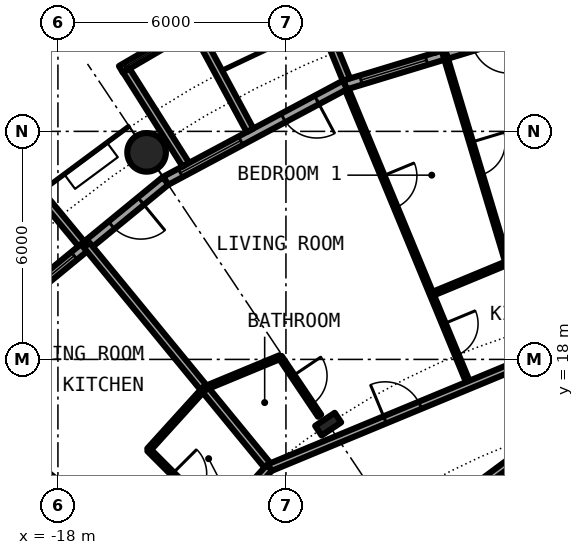
"""IFC4 building model, lengths in metres.
Left out: names, types, materials, properties, quantities, classifications, styles, units other than length and angle.
Written with IfcOpenShell. Run it as: python <this file> out.ifc"""

import sys

from ifc_helpers import new_model, si_unit, direction, frame, frame_2d, origin, origin_2d, place, context, subcontext, project, spatial, rectangle, circle, hollow_circle, i_section, extrude, element, fill, save


model = new_model("IFC4")
c1 = context("Model", 3, precision=1e-05, world=origin(), true_north=direction((0.0, 1.0)))
c2 = subcontext(c1, "Body", "Model", "MODEL_VIEW")
j1 = project(units=[si_unit("LENGTHUNIT", "METRE"), si_unit("PLANEANGLEUNIT", "RADIAN")], contexts=[c1])
p1 = place(None, origin())
s1 = spatial("IfcSite", under=j1, at=p1, CompositionType="ELEMENT")
p2 = place(p1, origin())
s2 = spatial("IfcBuilding", under=s1, at=p2, CompositionType="ELEMENT")
p3 = place(p2, frame((0.0, 0.0, 50.25)))
s3 = spatial("IfcBuildingStorey", under=s2, at=p3, CompositionType="ELEMENT", Elevation=50.25)
p4 = place(p3, frame((-15.667, 23.448, 0.0), z_axis=(0.0, 0.0, 1.0), x_axis=(1.0, 0.0, 0.0)))
e1 = element("IfcColumn", 1, at=p4, inside=s3, PredefinedType="COLUMN", context=c2, shape_type="SweptSolid", body=[
    extrude(hollow_circle(Radius=0.508, WallThickness=0.05, at=origin_2d()), origin(), (0.0, 0.0, 1.0), 3.05),
])
p5 = place(p3, frame((-10.889, 16.297, 0.0), z_axis=(0.0, 0.0, 1.0), x_axis=(-0.55557023302, 0.831469612303, 0.0)))
e2 = element("IfcColumn", 2, at=p5, inside=s3, PredefinedType="COLUMN", context=c2, shape_type="SweptSolid", body=[
    extrude(i_section(OverallWidth=0.305, OverallDepth=0.62, WebThickness=0.021, FlangeThickness=0.04, FilletRadius=0.027, at=origin_2d()), origin(), (0.0, 0.0, 1.0), 3.05),
])
p6 = place(p3, frame((-5.326, 26.775, 0.0), z_axis=(0.0, 0.0, 1.0), x_axis=(-0.956965678721, -0.290201119486, 0.0)))
e3 = element("IfcWall", 3, at=p6, inside=s3, PredefinedType="SOLIDWALL", context=c2, shape_type="SweptSolid", body=[
    extrude(rectangle(XDim=5.351, YDim=0.25, at=frame_2d((2.676, 0.0))), origin(), (0.0, 0.0, 1.0), 2.7),
])
p7 = place(p6, frame((0.841, 0.0, 0.0)))
e4 = element("IfcOpeningElement", 4, at=p7, cuts=e3, PredefinedType="OPENING", context=c2, shape_type="SweptSolid", body=[
    extrude(rectangle(XDim=1.0, YDim=2.2, at=frame_2d((0.5, 1.1))), frame((0.0, 0.135, 0.0), z_axis=(0.0, -1.0, 0.0), x_axis=(1.0, 0.0, 0.0)), (0.0, 0.0, 1.0), 0.27),
])
p8 = place(p6, frame((3.111, 0.0, 0.3)))
e5 = element("IfcOpeningElement", 5, at=p8, cuts=e3, PredefinedType="OPENING", context=c2, shape_type="SweptSolid", body=[
    extrude(rectangle(XDim=1.8, YDim=2.1, at=frame_2d((0.9, 1.05))), frame((0.0, 0.135, 0.0), z_axis=(0.0, -1.0, 0.0), x_axis=(1.0, 0.0, 0.0)), (0.0, 0.0, 1.0), 0.27),
])
p9 = place(p3, frame((-8.009, 26.092, -0.03), z_axis=(0.0, 0.0, 1.0), x_axis=(-0.293406695073, 0.955987715029, 0.0)))
e6 = element("IfcWall", 6, at=p9, inside=s3, PredefinedType="SOLIDWALL", context=c2, shape_type="SweptSolid", body=[
    extrude(rectangle(XDim=3.006, YDim=0.2, at=frame_2d((1.503, 0.0))), origin(), (0.0, 0.0, 1.0), 2.73),
])
p10 = place(p3, frame((-10.409, 25.364, -0.03), z_axis=(0.0, 0.0, 1.0), x_axis=(-0.379509886562, 0.925187681501, 0.0)))
e7 = element("IfcWall", 7, at=p10, inside=s3, PredefinedType="SOLIDWALL", context=c2, shape_type="SweptSolid", body=[
    extrude(rectangle(XDim=2.883, YDim=0.2, at=frame_2d((1.441, 0.0))), origin(), (0.0, 0.0, 1.0), 2.73),
])
p11 = place(p3, frame((-10.447, 25.222, 0.0), z_axis=(0.0, 0.0, 1.0), x_axis=(-0.881915646801, -0.471407246368, 0.0)))
e8 = element("IfcWall", 8, at=p11, inside=s3, PredefinedType="SOLIDWALL", context=c2, shape_type="SweptSolid", body=[
    extrude(rectangle(XDim=5.352, YDim=0.25, at=frame_2d((2.676, 0.0))), origin(), (0.0, 0.0, 1.0), 2.7),
])
p12 = place(p11, frame((0.841, 0.0, 0.0)))
e9 = element("IfcOpeningElement", 9, at=p12, cuts=e8, PredefinedType="OPENING", context=c2, shape_type="SweptSolid", body=[
    extrude(rectangle(XDim=1.0, YDim=2.2, at=frame_2d((0.5, 1.1))), frame((0.0, 0.135, 0.0), z_axis=(0.0, -1.0, 0.0), x_axis=(1.0, 0.0, 0.0)), (0.0, 0.0, 1.0), 0.27),
])
p13 = place(p11, frame((3.111, 0.0, 0.3)))
e10 = element("IfcOpeningElement", 10, at=p13, cuts=e8, PredefinedType="OPENING", context=c2, shape_type="SweptSolid", body=[
    extrude(rectangle(XDim=1.8, YDim=2.1, at=frame_2d((0.9, 1.05))), frame((0.0, 0.135, 0.0), z_axis=(0.0, -1.0, 0.0), x_axis=(1.0, 0.0, 0.0)), (0.0, 0.0, 1.0), 0.27),
])
p14 = place(p3, frame((-14.327, 26.812, -0.03), z_axis=(0.0, 0.0, 1.0), x_axis=(-0.863346521872, -0.504611517081, 0.0)))
e11 = element("IfcWall", 11, at=p14, inside=s3, PredefinedType="SOLIDWALL", context=c2, shape_type="SweptSolid", body=[
    extrude(rectangle(XDim=2.336, YDim=0.2, at=frame_2d((1.168, 0.0))), origin(), (0.0, 0.0, 1.0), 2.73),
])
p15 = place(p14, frame((0.128, 0.0, 0.33)))
e12 = element("IfcOpeningElement", 12, at=p15, cuts=e11, PredefinedType="OPENING", context=c2, shape_type="SweptSolid", body=[
    extrude(circle(Radius=1.04, at=frame_2d((1.04, 1.04))), frame((0.0, 0.11, 0.0), z_axis=(0.0, -1.0, 0.0), x_axis=(1.0, 0.0, 0.0)), (0.0, 0.0, 1.0), 0.22),
])
p16 = place(p3, frame((-12.945, 24.029, -0.03), z_axis=(0.0, 0.0, 1.0), x_axis=(-0.474424310775, 0.88029629861, 0.0)))
e13 = element("IfcWall", 13, at=p16, inside=s3, PredefinedType="SOLIDWALL", context=c2, shape_type="SweptSolid", body=[
    extrude(rectangle(XDim=3.006, YDim=0.2, at=frame_2d((1.503, 0.0))), origin(), (0.0, 0.0, 1.0), 2.73),
])
p17 = place(p3, frame((-14.635, 23.126, -0.03), z_axis=(0.0, 0.0, 1.0), x_axis=(-0.534437802731, 0.845207805816, 0.0)))
e14 = element("IfcWall", 14, at=p17, inside=s3, PredefinedType="SOLIDWALL", context=c2, shape_type="SweptSolid", body=[
    extrude(rectangle(XDim=2.932, YDim=0.2, at=frame_2d((1.466, 0.0))), origin(), (0.0, 0.0, 1.0), 2.73),
])
p18 = place(p3, frame((-15.167, 22.699, 0.0), z_axis=(0.0, 0.0, 1.0), x_axis=(-0.773019449054, -0.634382322723, 0.0)))
e15 = element("IfcWall", 15, at=p18, inside=s3, PredefinedType="SOLIDWALL", context=c2, shape_type="SweptSolid", body=[
    extrude(rectangle(XDim=5.352, YDim=0.25, at=frame_2d((2.676, 0.0))), origin(), (0.0, 0.0, 1.0), 2.7),
])
p19 = place(p18, frame((0.841, 0.0, 0.0)))
e16 = element("IfcOpeningElement", 16, at=p19, cuts=e15, PredefinedType="OPENING", context=c2, shape_type="SweptSolid", body=[
    extrude(rectangle(XDim=1.0, YDim=2.2, at=frame_2d((0.5, 1.1))), frame((0.0, 0.135, 0.0), z_axis=(0.0, -1.0, 0.0), x_axis=(1.0, 0.0, 0.0)), (0.0, 0.0, 1.0), 0.27),
])
p20 = place(p18, frame((3.111, 0.0, 0.3)))
e17 = element("IfcOpeningElement", 17, at=p20, cuts=e15, PredefinedType="OPENING", context=c2, shape_type="SweptSolid", body=[
    extrude(rectangle(XDim=1.8, YDim=2.1, at=frame_2d((0.9, 1.05))), frame((0.0, 0.135, 0.0), z_axis=(0.0, -1.0, 0.0), x_axis=(1.0, 0.0, 0.0)), (0.0, 0.0, 1.0), 0.27),
])
p21 = place(p3, frame((-17.384, 21.041, -0.03), z_axis=(0.0, 0.0, 1.0), x_axis=(-0.63709551667, 0.770784861449, 0.0)))
e18 = element("IfcWall", 18, at=p21, inside=s3, PredefinedType="SOLIDWALL", context=c2, shape_type="SweptSolid", body=[
    extrude(rectangle(XDim=3.006, YDim=0.2, at=frame_2d((1.503, 0.0))), origin(), (0.0, 0.0, 1.0), 2.73),
])
p22 = place(p3, frame((-10.398, 25.107, 0.0), z_axis=(0.0, 0.0, 1.0), x_axis=(0.382458509789, -0.923972666419, 0.0)))
e19 = element("IfcWall", 19, at=p22, inside=s3, PredefinedType="PARTITIONING", context=c2, shape_type="SweptSolid", body=[
    extrude(rectangle(XDim=8.419, YDim=0.1, at=frame_2d((4.209, 0.0))), origin(), (0.0, 0.0, 1.0), 2.7),
])
p23 = place(p22, frame((6.677, 0.0, 0.0)))
e20 = element("IfcOpeningElement", 20, at=p23, cuts=e19, PredefinedType="OPENING", context=c2, shape_type="SweptSolid", body=[
    extrude(rectangle(XDim=0.9, YDim=2.3, at=frame_2d((0.45, 1.15))), frame((0.0, 0.06, 0.0), z_axis=(0.0, -1.0, 0.0), x_axis=(1.0, 0.0, 0.0)), (0.0, 0.0, 1.0), 0.12),
])
p24 = place(p22, frame((2.468, 0.0, 0.0)))
e21 = element("IfcOpeningElement", 21, at=p24, cuts=e19, PredefinedType="OPENING", context=c2, shape_type="SweptSolid", body=[
    extrude(rectangle(XDim=0.9, YDim=2.3, at=frame_2d((0.45, 1.15))), frame((0.0, 0.06, 0.0), z_axis=(0.0, -1.0, 0.0), x_axis=(1.0, 0.0, 0.0)), (0.0, 0.0, 1.0), 0.12),
])
p25 = place(p3, frame((-22.596, 15.097, 0.0), z_axis=(0.0, 0.0, 1.0), x_axis=(0.831507055747, -0.555514190857, 0.0)))
e22 = element("IfcWall", 22, at=p25, inside=s3, PredefinedType="PARTITIONING", context=c2, shape_type="SweptSolid", body=[
    extrude(rectangle(XDim=7.265, YDim=0.2, at=frame_2d((3.633, 0.0))), origin(), (0.0, 0.0, 1.0), 2.7),
])
p26 = place(p3, frame((-21.014, 17.231, 0.0), z_axis=(0.0, 0.0, 1.0), x_axis=(0.773219330916, -0.634138680651, 0.0)))
e23 = element("IfcWall", 23, at=p26, inside=s3, PredefinedType="PARTITIONING", context=c2, shape_type="SweptSolid", body=[
    extrude(rectangle(XDim=5.089, YDim=0.1, at=frame_2d((2.544, 0.0))), origin(), (0.0, 0.0, 1.0), 2.7),
])
p27 = place(p26, frame((2.095, 0.0, 0.0)))
e24 = element("IfcOpeningElement", 24, at=p27, cuts=e23, PredefinedType="OPENING", context=c2, shape_type="SweptSolid", body=[
    extrude(rectangle(XDim=0.9, YDim=2.3, at=frame_2d((0.45, 1.15))), frame((0.0, 0.06, 0.0), z_axis=(0.0, -1.0, 0.0), x_axis=(1.0, 0.0, 0.0)), (0.0, 0.0, 1.0), 0.12),
])
p28 = place(p3, frame((-17.243, 21.005, 0.0), z_axis=(0.0, 0.0, 1.0), x_axis=(0.63447412651, -0.772944100689, 0.0)))
e25 = element("IfcWall", 25, at=p28, inside=s3, PredefinedType="PARTITIONING", context=c2, shape_type="SweptSolid", body=[
    extrude(rectangle(XDim=7.576, YDim=0.2, at=frame_2d((3.788, 0.0))), origin(), (0.0, 0.0, 1.0), 2.7),
])
p29 = place(p3, frame((-15.612, 15.622, 0.0), z_axis=(0.0, 0.0, 1.0), x_axis=(0.706741540154, -0.707471833659, 0.0)))
e26 = element("IfcWall", 26, at=p29, inside=s3, PredefinedType="PARTITIONING", context=c2, shape_type="SweptSolid", body=[
    extrude(rectangle(XDim=2.674, YDim=0.1, at=frame_2d((1.337, 0.0))), origin(), (0.0, 0.0, 1.0), 2.7),
])
p30 = place(p29, frame((0.887, 0.0, 0.0)))
e27 = element("IfcOpeningElement", 27, at=p30, cuts=e26, PredefinedType="OPENING", context=c2, shape_type="SweptSolid", body=[
    extrude(rectangle(XDim=0.9, YDim=2.3, at=frame_2d((0.45, 1.15))), frame((0.0, 0.06, 0.0), z_axis=(0.0, -1.0, 0.0), x_axis=(1.0, 0.0, 0.0)), (0.0, 0.0, 1.0), 0.12),
])
p31 = place(p3, frame((-12.153, 18.064, 0.0), z_axis=(0.0, 0.0, 1.0), x_axis=(0.558084773293, -0.829783939239, 0.0)))
e28 = element("IfcWall", 28, at=p31, inside=s3, PredefinedType="PARTITIONING", context=c2, shape_type="SweptSolid", body=[
    extrude(rectangle(XDim=1.862, YDim=0.1, at=frame_2d((0.931, 0.0))), origin(), (0.0, 0.0, 1.0), 2.7),
])
p32 = place(p31, frame((0.6, 0.0, 0.0)))
e29 = element("IfcOpeningElement", 29, at=p32, cuts=e28, PredefinedType="OPENING", context=c2, shape_type="SweptSolid", body=[
    extrude(rectangle(XDim=0.9, YDim=2.3, at=frame_2d((0.45, 1.15))), frame((0.0, 0.06, 0.0), z_axis=(0.0, -1.0, 0.0), x_axis=(1.0, 0.0, 0.0)), (0.0, 0.0, 1.0), 0.12),
])
p33 = place(p3, frame((-7.821, 26.025, 0.0), z_axis=(0.0, 0.0, 1.0), x_axis=(0.287793773423, -0.957692405723, 0.0)))
e30 = element("IfcWall", 30, at=p33, inside=s3, PredefinedType="PARTITIONING", context=c2, shape_type="SweptSolid", body=[
    extrude(rectangle(XDim=5.726, YDim=0.1, at=frame_2d((2.863, 0.0))), origin(), (0.0, 0.0, 1.0), 2.7),
])
p34 = place(p33, frame((2.413, 0.0, 0.0)))
e31 = element("IfcOpeningElement", 31, at=p34, cuts=e30, PredefinedType="OPENING", context=c2, shape_type="SweptSolid", body=[
    extrude(rectangle(XDim=0.9, YDim=2.3, at=frame_2d((0.45, 1.15))), frame((0.0, 0.06, 0.0), z_axis=(0.0, -1.0, 0.0), x_axis=(1.0, 0.0, 0.0)), (0.0, 0.0, 1.0), 0.12),
])
p35 = place(p3, frame((-14.037, 9.4, 0.0), z_axis=(0.0, 0.0, 1.0), x_axis=(0.803202106898, 0.595706618626, 0.0)))
e32 = element("IfcWall", 32, at=p35, inside=s3, PredefinedType="PARTITIONING", context=c2, shape_type="SweptSolid", body=[
    extrude(rectangle(XDim=11.368, YDim=0.2, at=frame_2d((5.684, 0.0))), origin(), (0.0, 0.0, 1.0), 2.7),
])
p36 = place(p35, frame((5.988, 0.0, 0.0)))
e33 = element("IfcOpeningElement", 33, at=p36, cuts=e32, PredefinedType="OPENING", context=c2, shape_type="SweptSolid", body=[
    extrude(rectangle(XDim=1.0, YDim=2.3, at=frame_2d((0.5, 1.15))), frame((0.0, 0.11, 0.0), z_axis=(0.0, -1.0, 0.0), x_axis=(1.0, 0.0, 0.0)), (0.0, 0.0, 1.0), 0.22),
])
p37 = place(p3, frame((-12.435, 15.15, 0.0), z_axis=(0.0, 0.0, 1.0), x_axis=(0.923845560554, 0.38276543763, 0.0)))
e34 = element("IfcWall", 34, at=p37, inside=s3, PredefinedType="PARTITIONING", context=c2, shape_type="SweptSolid", body=[
    extrude(rectangle(XDim=11.381, YDim=0.2, at=frame_2d((5.69, 0.0))), origin(), (0.0, 0.0, 1.0), 2.7),
])
p38 = place(p37, frame((3.293, 0.0, 0.0)))
e35 = element("IfcOpeningElement", 35, at=p38, cuts=e34, PredefinedType="OPENING", context=c2, shape_type="SweptSolid", body=[
    extrude(rectangle(XDim=1.0, YDim=2.3, at=frame_2d((0.5, 1.15))), frame((0.0, 0.11, 0.0), z_axis=(0.0, -1.0, 0.0), x_axis=(1.0, 0.0, 0.0)), (0.0, 0.0, 1.0), 0.22),
])
p39 = place(p3, frame((-16.193, 11.003, 0.0), z_axis=(0.0, 0.0, 1.0), x_axis=(0.671514934772, 0.740991020444, 0.0)))
e36 = element("IfcWall", 36, at=p39, inside=s3, PredefinedType="PARTITIONING", context=c2, shape_type="SweptSolid", body=[
    extrude(rectangle(XDim=5.598, YDim=0.2, at=frame_2d((2.799, 0.0))), origin(), (0.0, 0.0, 1.0), 2.38),
])
p40 = place(p39, frame((1.293, 0.0, 0.0)))
e37 = element("IfcOpeningElement", 37, at=p40, cuts=e36, PredefinedType="OPENING", context=c2, shape_type="SweptSolid", body=[
    extrude(rectangle(XDim=1.0, YDim=2.3, at=frame_2d((0.5, 1.15))), frame((0.0, 0.11, 0.0), z_axis=(0.0, -1.0, 0.0), x_axis=(1.0, 0.0, 0.0)), (0.0, 0.0, 1.0), 0.22),
])
p41 = place(p3, frame((-14.149, 17.236, 0.0), z_axis=(0.0, 0.0, 1.0), x_axis=(0.923874819588, 0.382694810171, 0.0)))
e38 = element("IfcWall", 38, at=p41, inside=s3, PredefinedType="PARTITIONING", context=c2, shape_type="SweptSolid", body=[
    extrude(rectangle(XDim=2.158, YDim=0.1, at=frame_2d((1.079, 0.0))), origin(), (0.0, 0.0, 1.0), 2.7),
])
p42 = place(p3, frame((-8.166, 19.715, 0.0), z_axis=(0.0, 0.0, 1.0), x_axis=(0.923844914631, 0.382766996632, 0.0)))
e39 = element("IfcWall", 39, at=p42, inside=s3, PredefinedType="PARTITIONING", context=c2, shape_type="SweptSolid", body=[
    extrude(rectangle(XDim=6.474, YDim=0.1, at=frame_2d((3.237, 0.0))), origin(), (0.0, 0.0, 1.0), 2.7),
])
p43 = place(p3, frame((-15.613, 15.621, 0.0), z_axis=(0.0, 0.0, 1.0), x_axis=(0.67169789574, 0.740825172937, 0.0)))
e40 = element("IfcWall", 40, at=p43, inside=s3, PredefinedType="PARTITIONING", context=c2, shape_type="SweptSolid", body=[
    extrude(rectangle(XDim=2.183, YDim=0.1, at=frame_2d((1.091, 0.0))), origin(), (0.0, 0.0, 1.0), 2.7),
])
p44 = place(p8, origin())
e41 = element("IfcWindow", 41, at=p44, inside=s3, PartitioningType="SINGLE_PANEL", PredefinedType="WINDOW", context=c2, shape_type="SweptSolid", body=[
    extrude(rectangle(XDim=1.8, YDim=2.1, at=frame_2d((0.9, 1.05))), frame((0.0, 0.03, 0.0), z_axis=(0.0, -1.0, 0.0), x_axis=(1.0, 0.0, 0.0)), (0.0, 0.0, 1.0), 0.06),
])
fill(e5, e41)
p45 = place(p12, origin())
e42 = element("IfcDoor", 42, at=p45, inside=s3, OperationType="SINGLE_SWING_LEFT", PredefinedType="DOOR", context=c2, shape_type="SweptSolid", body=[
    extrude(rectangle(XDim=1.0, YDim=2.2, at=frame_2d((0.5, 1.1))), frame((0.0, 0.025, 0.0), z_axis=(0.0, -1.0, 0.0), x_axis=(1.0, 0.0, 0.0)), (0.0, 0.0, 1.0), 0.05),
])
fill(e9, e42)
p46 = place(p13, origin())
e43 = element("IfcWindow", 43, at=p46, inside=s3, PartitioningType="SINGLE_PANEL", PredefinedType="WINDOW", context=c2, shape_type="SweptSolid", body=[
    extrude(rectangle(XDim=1.8, YDim=2.1, at=frame_2d((0.9, 1.05))), frame((0.0, 0.03, 0.0), z_axis=(0.0, -1.0, 0.0), x_axis=(1.0, 0.0, 0.0)), (0.0, 0.0, 1.0), 0.06),
])
fill(e10, e43)
p47 = place(p15, origin())
e44 = element("IfcWindow", 44, at=p47, inside=s3, PartitioningType="SINGLE_PANEL", PredefinedType="WINDOW", context=c2, shape_type="SweptSolid", body=[
    extrude(circle(Radius=1.04, at=frame_2d((1.04, 1.04))), frame((0.0, 0.03, 0.0), z_axis=(0.0, -1.0, 0.0), x_axis=(1.0, 0.0, 0.0)), (0.0, 0.0, 1.0), 0.06),
])
fill(e12, e44)
p48 = place(p19, origin())
e45 = element("IfcDoor", 45, at=p48, inside=s3, OperationType="SINGLE_SWING_LEFT", PredefinedType="DOOR", context=c2, shape_type="SweptSolid", body=[
    extrude(rectangle(XDim=1.0, YDim=2.2, at=frame_2d((0.5, 1.1))), frame((0.0, 0.025, 0.0), z_axis=(0.0, -1.0, 0.0), x_axis=(1.0, 0.0, 0.0)), (0.0, 0.0, 1.0), 0.05),
])
fill(e16, e45)
p49 = place(p20, origin())
e46 = element("IfcWindow", 46, at=p49, inside=s3, PartitioningType="SINGLE_PANEL", PredefinedType="WINDOW", context=c2, shape_type="SweptSolid", body=[
    extrude(rectangle(XDim=1.8, YDim=2.1, at=frame_2d((0.9, 1.05))), frame((0.0, 0.03, 0.0), z_axis=(0.0, -1.0, 0.0), x_axis=(1.0, 0.0, 0.0)), (0.0, 0.0, 1.0), 0.06),
])
fill(e17, e46)
p50 = place(p38, origin())
e47 = element("IfcDoor", 47, at=p50, inside=s3, OperationType="SINGLE_SWING_LEFT", PredefinedType="DOOR", context=c2, shape_type="SweptSolid", body=[
    extrude(rectangle(XDim=1.0, YDim=2.3, at=frame_2d((0.5, 1.15))), frame((0.0, 0.025, 0.0), z_axis=(0.0, -1.0, 0.0), x_axis=(1.0, 0.0, 0.0)), (0.0, 0.0, 1.0), 0.05),
])
fill(e35, e47)
p51 = place(p32, origin())
e48 = element("IfcDoor", 48, at=p51, inside=s3, OperationType="SINGLE_SWING_RIGHT", PredefinedType="DOOR", context=c2, shape_type="SweptSolid", body=[
    extrude(rectangle(XDim=0.9, YDim=2.3, at=frame_2d((0.45, 1.15))), frame((0.0, 0.025, 0.0), z_axis=(0.0, -1.0, 0.0), x_axis=(1.0, 0.0, 0.0)), (0.0, 0.0, 1.0), 0.05),
])
fill(e29, e48)
p52 = place(p23, origin())
e49 = element("IfcDoor", 49, at=p52, inside=s3, OperationType="SINGLE_SWING_RIGHT", PredefinedType="DOOR", context=c2, shape_type="SweptSolid", body=[
    extrude(rectangle(XDim=0.9, YDim=2.3, at=frame_2d((0.45, 1.15))), frame((0.0, 0.025, 0.0), z_axis=(0.0, -1.0, 0.0), x_axis=(1.0, 0.0, 0.0)), (0.0, 0.0, 1.0), 0.05),
])
fill(e20, e49)
p53 = place(p24, origin())
e50 = element("IfcDoor", 50, at=p53, inside=s3, OperationType="SINGLE_SWING_LEFT", PredefinedType="DOOR", context=c2, shape_type="SweptSolid", body=[
    extrude(rectangle(XDim=0.9, YDim=2.3, at=frame_2d((0.45, 1.15))), frame((0.0, 0.025, 0.0), z_axis=(0.0, -1.0, 0.0), x_axis=(1.0, 0.0, 0.0)), (0.0, 0.0, 1.0), 0.05),
])
fill(e21, e50)
p54 = place(p34, origin())
e51 = element("IfcDoor", 51, at=p54, inside=s3, OperationType="SINGLE_SWING_LEFT", PredefinedType="DOOR", context=c2, shape_type="SweptSolid", body=[
    extrude(rectangle(XDim=0.9, YDim=2.3, at=frame_2d((0.45, 1.15))), frame((0.0, 0.025, 0.0), z_axis=(0.0, -1.0, 0.0), x_axis=(1.0, 0.0, 0.0)), (0.0, 0.0, 1.0), 0.05),
])
fill(e31, e51)
p55 = place(p30, origin())
e52 = element("IfcDoor", 52, at=p55, inside=s3, OperationType="SINGLE_SWING_RIGHT", PredefinedType="DOOR", context=c2, shape_type="SweptSolid", body=[
    extrude(rectangle(XDim=0.9, YDim=2.3, at=frame_2d((0.45, 1.15))), frame((0.0, 0.025, 0.0), z_axis=(0.0, -1.0, 0.0), x_axis=(1.0, 0.0, 0.0)), (0.0, 0.0, 1.0), 0.05),
])
fill(e27, e52)
save(model, sys.argv[1])
